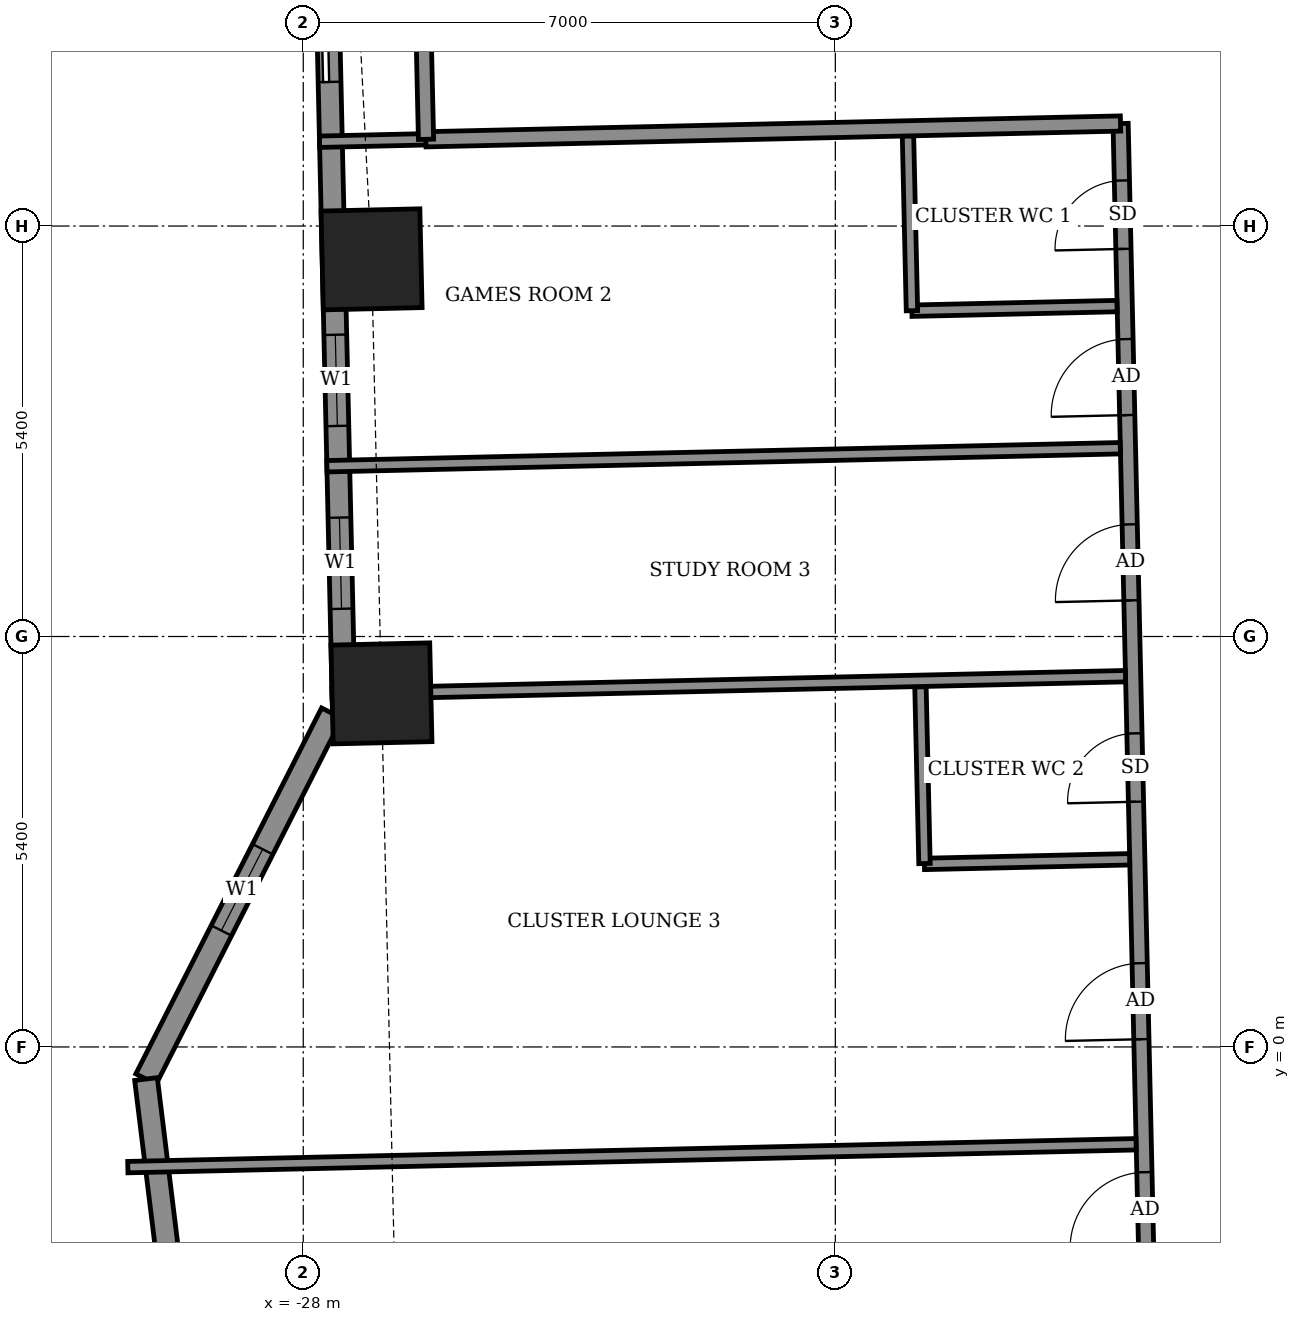
"""IFC4 building model, lengths in metres.
Left out: names, types, materials, properties, quantities, classifications, styles, units other than length and angle.
Written with IfcOpenShell. Run it as: python <this file> out.ifc"""

import sys

from ifc_helpers import new_model, si_unit, direction, frame, frame_2d, origin, origin_2d, place, context, subcontext, project, spatial, rectangle, extrude, element, fill, save


model = new_model("IFC4")
c1 = context("Model", 3, precision=1e-05, world=origin(), true_north=direction((0.0, 1.0)))
c2 = subcontext(c1, "Body", "Model", "MODEL_VIEW")
j1 = project(units=[si_unit("LENGTHUNIT", "METRE"), si_unit("PLANEANGLEUNIT", "RADIAN")], contexts=[c1])
p1 = place(None, origin())
s1 = spatial("IfcSite", under=j1, at=p1, CompositionType="ELEMENT")
p2 = place(p1, origin())
s2 = spatial("IfcBuilding", under=s1, at=p2, CompositionType="ELEMENT")
p3 = place(p2, frame((0.0, 0.0, 130.1)))
s3 = spatial("IfcBuildingStorey", under=s2, at=p3, CompositionType="ELEMENT", Elevation=130.1)
for number, where, z_axis, x_axis in (
    (1, (-27.101, 10.362, -0.55), (0.0, 0.0, 1.0), (0.023, -1.0, 0.0)),
    (2, (-26.971, 4.652, -0.55), (0.0, 0.0, 1.0), (0.023, -1.0, 0.0)),
):
    element("IfcColumn", number, at=place(p3, frame(where, z_axis=z_axis, x_axis=x_axis)), inside=s3, PredefinedType="COLUMN", context=c2, shape_type="SweptSolid", body=[
        extrude(rectangle(XDim=1.3, YDim=1.3, at=origin_2d()), origin(), (0.0, 0.0, 1.0), 3.6),
    ])
p4 = place(p3, frame((-27.727, 15.912, 0.0), z_axis=(0.0, 0.0, 1.0), x_axis=(0.022690078929, -0.999742547018, 0.0)))
e3 = element("IfcWall", 3, at=p4, inside=s3, PredefinedType="SOLIDWALL", context=c2, shape_type="SweptSolid", body=[
    extrude(rectangle(XDim=11.33, YDim=0.3, at=frame_2d((5.665, 0.0))), origin(), (0.0, 0.0, 1.0), 3.05),
])
p5 = place(p4, frame((1.717, 0.0, 0.0)))
e4 = element("IfcOpeningElement", 4, at=p5, cuts=e3, PredefinedType="OPENING", context=c2, shape_type="SweptSolid", body=[
    extrude(rectangle(XDim=1.5, YDim=2.4, at=frame_2d((0.75, 1.2))), frame((0.0, 0.16, 0.0), z_axis=(0.0, -1.0, 0.0), x_axis=(1.0, 0.0, 0.0)), (0.0, 0.0, 1.0), 0.32),
])
p6 = place(p4, frame((6.544, 0.0, 0.9)))
e5 = element("IfcOpeningElement", 5, at=p6, cuts=e3, PredefinedType="OPENING", context=c2, shape_type="SweptSolid", body=[
    extrude(rectangle(XDim=1.2, YDim=1.5, at=frame_2d((0.6, 0.75))), frame((0.0, 0.16, 0.0), z_axis=(0.0, -1.0, 0.0), x_axis=(1.0, 0.0, 0.0)), (0.0, 0.0, 1.0), 0.32),
])
p7 = place(p4, frame((8.95, 0.0, 0.9)))
e6 = element("IfcOpeningElement", 6, at=p7, cuts=e3, PredefinedType="OPENING", context=c2, shape_type="SweptSolid", body=[
    extrude(rectangle(XDim=1.2, YDim=1.5, at=frame_2d((0.6, 0.75))), frame((0.0, 0.16, 0.0), z_axis=(0.0, -1.0, 0.0), x_axis=(1.0, 0.0, 0.0)), (0.0, 0.0, 1.0), 0.32),
])
p8 = place(p3, frame((-27.625, 4.392, 0.0), z_axis=(0.0, 0.0, 1.0), x_axis=(-0.45268572245, -0.891670138947, 0.0)))
e7 = element("IfcWall", 7, at=p8, inside=s3, PredefinedType="SOLIDWALL", context=c2, shape_type="SweptSolid", body=[
    extrude(rectangle(XDim=5.399, YDim=0.3, at=frame_2d((2.7, 0.0))), origin(), (0.0, 0.0, 1.0), 3.05),
])
p9 = place(p8, frame((2.008, 0.0, 0.9)))
e8 = element("IfcOpeningElement", 8, at=p9, cuts=e7, PredefinedType="OPENING", context=c2, shape_type="SweptSolid", body=[
    extrude(rectangle(XDim=1.2, YDim=1.5, at=frame_2d((0.6, 0.75))), frame((0.0, 0.16, 0.0), z_axis=(0.0, -1.0, 0.0), x_axis=(1.0, 0.0, 0.0)), (0.0, 0.0, 1.0), 0.32),
])
p10 = place(p3, frame((-30.069, -0.422, 0.0), z_axis=(0.0, 0.0, 1.0), x_axis=(0.122206978992, -0.992504636909, 0.0)))
e9 = element("IfcWall", 9, at=p10, inside=s3, PredefinedType="SOLIDWALL", context=c2, shape_type="SweptSolid", body=[
    extrude(rectangle(XDim=5.574, YDim=0.3, at=frame_2d((2.787, 0.0))), origin(), (0.0, 0.0, 1.0), 3.05),
])
p11 = place(p10, frame((2.187, 0.0, 0.9)))
e10 = element("IfcOpeningElement", 10, at=p11, cuts=e9, PredefinedType="OPENING", context=c2, shape_type="SweptSolid", body=[
    extrude(rectangle(XDim=1.2, YDim=1.5, at=frame_2d((0.6, 0.75))), frame((0.0, 0.16, 0.0), z_axis=(0.0, -1.0, 0.0), x_axis=(1.0, 0.0, 0.0)), (0.0, 0.0, 1.0), 0.32),
])
p12 = place(p3, frame((-30.42, 12.7, 0.0), z_axis=(0.0, 0.0, 1.0), x_axis=(-0.02278694782, 0.999740343794, 0.0)))
e11 = element("IfcWall", 11, at=p12, inside=s3, PredefinedType="USERDEFINED", context=c2, shape_type="SweptSolid", body=[
    extrude(rectangle(XDim=3.3, YDim=0.55, at=frame_2d((1.65, 0.0))), origin(), (0.0, 0.0, 1.0), 0.8),
])
p13 = place(p3, frame((-16.603, -16.218, 0.0), z_axis=(0.0, 0.0, 1.0), x_axis=(-0.022698146637, 0.999742363881, 0.0)))
e12 = element("IfcWall", 12, at=p13, inside=s3, PredefinedType="PARTITIONING", context=c2, shape_type="SweptSolid", body=[
    extrude(rectangle(XDim=28.374, YDim=0.2, at=frame_2d((14.187, 0.0))), origin(), (0.0, 0.0, 1.0), 3.05),
])
p14 = place(p13, frame((24.537, 0.0, 0.0)))
e13 = element("IfcOpeningElement", 13, at=p14, cuts=e12, PredefinedType="OPENING", context=c2, shape_type="SweptSolid", body=[
    extrude(rectangle(XDim=1.0, YDim=2.1, at=frame_2d((0.5, 1.05))), frame((0.0, 0.11, 0.0), z_axis=(0.0, -1.0, 0.0), x_axis=(1.0, 0.0, 0.0)), (0.0, 0.0, 1.0), 0.22),
])
p15 = place(p13, frame((26.724, 0.0, 0.0)))
e14 = element("IfcOpeningElement", 14, at=p15, cuts=e12, PredefinedType="OPENING", context=c2, shape_type="SweptSolid", body=[
    extrude(rectangle(XDim=0.9, YDim=2.1, at=frame_2d((0.45, 1.05))), frame((0.0, 0.11, 0.0), z_axis=(0.0, -1.0, 0.0), x_axis=(1.0, 0.0, 0.0)), (0.0, 0.0, 1.0), 0.22),
])
p16 = place(p13, frame((22.099, 0.0, 0.0)))
e15 = element("IfcOpeningElement", 15, at=p16, cuts=e12, PredefinedType="OPENING", context=c2, shape_type="SweptSolid", body=[
    extrude(rectangle(XDim=1.0, YDim=2.1, at=frame_2d((0.5, 1.05))), frame((0.0, 0.11, 0.0), z_axis=(0.0, -1.0, 0.0), x_axis=(1.0, 0.0, 0.0)), (0.0, 0.0, 1.0), 0.22),
])
p17 = place(p13, frame((16.324, 0.0, 0.0)))
e16 = element("IfcOpeningElement", 16, at=p17, cuts=e12, PredefinedType="OPENING", context=c2, shape_type="SweptSolid", body=[
    extrude(rectangle(XDim=1.0, YDim=2.1, at=frame_2d((0.5, 1.05))), frame((0.0, 0.11, 0.0), z_axis=(0.0, -1.0, 0.0), x_axis=(1.0, 0.0, 0.0)), (0.0, 0.0, 1.0), 0.22),
])
p18 = place(p13, frame((19.449, 0.0, 0.0)))
e17 = element("IfcOpeningElement", 17, at=p18, cuts=e12, PredefinedType="OPENING", context=c2, shape_type="SweptSolid", body=[
    extrude(rectangle(XDim=0.9, YDim=2.1, at=frame_2d((0.45, 1.05))), frame((0.0, 0.11, 0.0), z_axis=(0.0, -1.0, 0.0), x_axis=(1.0, 0.0, 0.0)), (0.0, 0.0, 1.0), 0.22),
])
p19 = place(p13, frame((13.574, 0.0, 0.0)))
e18 = element("IfcOpeningElement", 18, at=p19, cuts=e12, PredefinedType="OPENING", context=c2, shape_type="SweptSolid", body=[
    extrude(rectangle(XDim=1.0, YDim=2.1, at=frame_2d((0.5, 1.05))), frame((0.0, 0.11, 0.0), z_axis=(0.0, -1.0, 0.0), x_axis=(1.0, 0.0, 0.0)), (0.0, 0.0, 1.0), 0.22),
])
p20 = place(p13, frame((11.449, 0.0, 0.0)))
e19 = element("IfcOpeningElement", 19, at=p20, cuts=e12, PredefinedType="OPENING", context=c2, shape_type="SweptSolid", body=[
    extrude(rectangle(XDim=0.9, YDim=2.1, at=frame_2d((0.45, 1.05))), frame((0.0, 0.11, 0.0), z_axis=(0.0, -1.0, 0.0), x_axis=(1.0, 0.0, 0.0)), (0.0, 0.0, 1.0), 0.22),
])
p21 = place(p13, frame((8.524, 0.0, 0.0)))
e20 = element("IfcOpeningElement", 20, at=p21, cuts=e12, PredefinedType="OPENING", context=c2, shape_type="SweptSolid", body=[
    extrude(rectangle(XDim=1.0, YDim=2.1, at=frame_2d((0.5, 1.05))), frame((0.0, 0.11, 0.0), z_axis=(0.0, -1.0, 0.0), x_axis=(1.0, 0.0, 0.0)), (0.0, 0.0, 1.0), 0.22),
])
p22 = place(p13, frame((5.325, 0.0, 0.0)))
e21 = element("IfcOpeningElement", 21, at=p22, cuts=e12, PredefinedType="OPENING", context=c2, shape_type="SweptSolid", body=[
    extrude(rectangle(XDim=1.0, YDim=2.1, at=frame_2d((0.5, 1.05))), frame((0.0, 0.11, 0.0), z_axis=(0.0, -1.0, 0.0), x_axis=(1.0, 0.0, 0.0)), (0.0, 0.0, 1.0), 0.22),
])
p23 = place(p13, frame((2.85, 0.0, 0.0)))
e22 = element("IfcOpeningElement", 22, at=p23, cuts=e12, PredefinedType="OPENING", context=c2, shape_type="SweptSolid", body=[
    extrude(rectangle(XDim=1.0, YDim=2.1, at=frame_2d((0.5, 1.05))), frame((0.0, 0.11, 0.0), z_axis=(0.0, -1.0, 0.0), x_axis=(1.0, 0.0, 0.0)), (0.0, 0.0, 1.0), 0.22),
])
p24 = place(p13, frame((0.75, 0.0, 0.0)))
e23 = element("IfcOpeningElement", 23, at=p24, cuts=e12, PredefinedType="OPENING", context=c2, shape_type="SweptSolid", body=[
    extrude(rectangle(XDim=0.9, YDim=2.1, at=frame_2d((0.45, 1.05))), frame((0.0, 0.11, 0.0), z_axis=(0.0, -1.0, 0.0), x_axis=(1.0, 0.0, 0.0)), (0.0, 0.0, 1.0), 0.22),
])
p25 = place(p3, frame((-30.308, -1.581, 0.0), z_axis=(0.0, 0.0, 1.0), x_axis=(0.999742613892, 0.022687132236, 0.0)))
e24 = element("IfcWall", 24, at=p25, inside=s3, PredefinedType="PARTITIONING", context=c2, shape_type="SweptSolid", body=[
    extrude(rectangle(XDim=13.269, YDim=0.15, at=frame_2d((6.634, 0.0))), origin(), (0.0, 0.0, 1.0), 2.05),
])
p26 = place(p3, frame((-19.828, 2.408, 0.0), z_axis=(0.0, 0.0, 1.0), x_axis=(0.99974458177, 0.022600248254, 0.0)))
e25 = element("IfcWall", 25, at=p26, inside=s3, PredefinedType="PARTITIONING", context=c2, shape_type="SweptSolid", body=[
    extrude(rectangle(XDim=2.701, YDim=0.15, at=frame_2d((1.35, 0.0))), origin(), (0.0, 0.0, 1.0), 3.05),
])
p27 = place(p3, frame((-19.827, 2.413, 0.0), z_axis=(0.0, 0.0, 1.0), x_axis=(-0.02279059109, 0.999740260747, 0.0)))
e26 = element("IfcWall", 26, at=p27, inside=s3, PredefinedType="PARTITIONING", context=c2, shape_type="SweptSolid", body=[
    extrude(rectangle(XDim=2.324, YDim=0.15, at=frame_2d((1.162, 0.0))), origin(), (0.0, 0.0, 1.0), 3.05),
])
p28 = place(p3, frame((-27.621, 4.641, 0.0), z_axis=(0.0, 0.0, 1.0), x_axis=(0.999742728106, 0.022682098664, 0.0)))
e27 = element("IfcWall", 27, at=p28, inside=s3, PredefinedType="PARTITIONING", context=c2, shape_type="SweptSolid", body=[
    extrude(rectangle(XDim=10.441, YDim=0.15, at=frame_2d((5.22, 0.0))), origin(), (0.0, 0.0, 1.0), 3.05),
])
p29 = place(p3, frame((-27.689, 7.64, 0.0), z_axis=(0.0, 0.0, 1.0), x_axis=(0.99974219758, 0.022705470222, 0.0)))
e28 = element("IfcWall", 28, at=p29, inside=s3, PredefinedType="PARTITIONING", context=c2, shape_type="SweptSolid", body=[
    extrude(rectangle(XDim=10.441, YDim=0.15, at=frame_2d((5.22, 0.0))), origin(), (0.0, 0.0, 1.0), 2.55),
])
p30 = place(p3, frame((-19.993, 9.686, 0.0), z_axis=(0.0, 0.0, 1.0), x_axis=(0.999744396973, 0.02260842146, 0.0)))
e29 = element("IfcWall", 29, at=p30, inside=s3, PredefinedType="PARTITIONING", context=c2, shape_type="SweptSolid", body=[
    extrude(rectangle(XDim=2.7, YDim=0.15, at=frame_2d((1.35, 0.0))), origin(), (0.0, 0.0, 1.0), 3.05),
])
p31 = place(p3, frame((-19.992, 9.686, 0.0), z_axis=(0.0, 0.0, 1.0), x_axis=(-0.022612884682, 0.999744296031, 0.0)))
e30 = element("IfcWall", 30, at=p31, inside=s3, PredefinedType="PARTITIONING", context=c2, shape_type="SweptSolid", body=[
    extrude(rectangle(XDim=2.3, YDim=0.15, at=frame_2d((1.15, 0.0))), origin(), (0.0, 0.0, 1.0), 3.05),
])
p32 = place(p3, frame((-27.786, 11.909, 0.0), z_axis=(0.0, 0.0, 1.0), x_axis=(0.999740216184, 0.022792545827, 0.0)))
e31 = element("IfcWall", 31, at=p32, inside=s3, PredefinedType="PARTITIONING", context=c2, shape_type="SweptSolid", body=[
    extrude(rectangle(XDim=1.403, YDim=0.15, at=frame_2d((0.702, 0.0))), origin(), (0.0, 0.0, 1.0), 2.55),
])
p33 = place(p3, frame((-26.387, 11.941, 0.0), z_axis=(0.0, 0.0, 1.0), x_axis=(0.999741076645, 0.022754772455, 0.0)))
e32 = element("IfcWall", 32, at=p33, inside=s3, PredefinedType="PARTITIONING", context=c2, shape_type="SweptSolid", body=[
    extrude(rectangle(XDim=9.141, YDim=0.2, at=frame_2d((4.571, 0.0))), origin(), (0.0, 0.0, 1.0), 3.05),
])
p34 = place(p3, frame((-26.385, 11.941, 0.0), z_axis=(0.0, 0.0, 1.0), x_axis=(-0.022617910375, 0.999744182344, 0.0)))
e33 = element("IfcWall", 33, at=p34, inside=s3, PredefinedType="PARTITIONING", context=c2, shape_type="SweptSolid", body=[
    extrude(rectangle(XDim=1.5, YDim=0.2, at=frame_2d((0.75, 0.0))), origin(), (0.0, 0.0, 1.0), 3.05),
])
p35 = place(p5, origin())
e34 = element("IfcDoor", 34, at=p35, inside=s3, OperationType="SLIDING_TO_LEFT", PredefinedType="DOOR", context=c2, shape_type="SweptSolid", body=[
    extrude(rectangle(XDim=1.5, YDim=2.4, at=frame_2d((0.75, 1.2))), frame((0.0, 0.025, 0.0), z_axis=(0.0, -1.0, 0.0), x_axis=(1.0, 0.0, 0.0)), (0.0, 0.0, 1.0), 0.05),
])
fill(e4, e34)
p36 = place(p6, origin())
e35 = element("IfcWindow", 35, at=p36, inside=s3, PartitioningType="SINGLE_PANEL", PredefinedType="WINDOW", context=c2, shape_type="SweptSolid", body=[
    extrude(rectangle(XDim=1.2, YDim=1.5, at=frame_2d((0.6, 0.75))), frame((0.0, 0.03, 0.0), z_axis=(0.0, -1.0, 0.0), x_axis=(1.0, 0.0, 0.0)), (0.0, 0.0, 1.0), 0.06),
])
fill(e5, e35)
p37 = place(p7, origin())
e36 = element("IfcWindow", 36, at=p37, inside=s3, PartitioningType="SINGLE_PANEL", PredefinedType="WINDOW", context=c2, shape_type="SweptSolid", body=[
    extrude(rectangle(XDim=1.2, YDim=1.5, at=frame_2d((0.6, 0.75))), frame((0.0, 0.03, 0.0), z_axis=(0.0, -1.0, 0.0), x_axis=(1.0, 0.0, 0.0)), (0.0, 0.0, 1.0), 0.06),
])
fill(e6, e36)
p38 = place(p9, origin())
e37 = element("IfcWindow", 37, at=p38, inside=s3, PartitioningType="SINGLE_PANEL", PredefinedType="WINDOW", context=c2, shape_type="SweptSolid", body=[
    extrude(rectangle(XDim=1.2, YDim=1.5, at=frame_2d((0.6, 0.75))), frame((0.0, 0.03, 0.0), z_axis=(0.0, -1.0, 0.0), x_axis=(1.0, 0.0, 0.0)), (0.0, 0.0, 1.0), 0.06),
])
fill(e8, e37)
p39 = place(p14, origin())
e38 = element("IfcDoor", 38, at=p39, inside=s3, OperationType="SINGLE_SWING_RIGHT", PredefinedType="DOOR", context=c2, shape_type="SweptSolid", body=[
    extrude(rectangle(XDim=1.0, YDim=2.1, at=frame_2d((0.5, 1.05))), frame((0.0, 0.025, 0.0), z_axis=(0.0, -1.0, 0.0), x_axis=(1.0, 0.0, 0.0)), (0.0, 0.0, 1.0), 0.05),
])
fill(e13, e38)
p40 = place(p15, origin())
e39 = element("IfcDoor", 39, at=p40, inside=s3, OperationType="SINGLE_SWING_LEFT", PredefinedType="DOOR", context=c2, shape_type="SweptSolid", body=[
    extrude(rectangle(XDim=0.9, YDim=2.1, at=frame_2d((0.45, 1.05))), frame((0.0, 0.025, 0.0), z_axis=(0.0, -1.0, 0.0), x_axis=(1.0, 0.0, 0.0)), (0.0, 0.0, 1.0), 0.05),
])
fill(e14, e39)
p41 = place(p16, origin())
e40 = element("IfcDoor", 40, at=p41, inside=s3, OperationType="SINGLE_SWING_LEFT", PredefinedType="DOOR", context=c2, shape_type="SweptSolid", body=[
    extrude(rectangle(XDim=1.0, YDim=2.1, at=frame_2d((0.5, 1.05))), frame((0.0, 0.025, 0.0), z_axis=(0.0, -1.0, 0.0), x_axis=(1.0, 0.0, 0.0)), (0.0, 0.0, 1.0), 0.05),
])
fill(e15, e40)
p42 = place(p17, origin())
e41 = element("IfcDoor", 41, at=p42, inside=s3, OperationType="SINGLE_SWING_RIGHT", PredefinedType="DOOR", context=c2, shape_type="SweptSolid", body=[
    extrude(rectangle(XDim=1.0, YDim=2.1, at=frame_2d((0.5, 1.05))), frame((0.0, 0.025, 0.0), z_axis=(0.0, -1.0, 0.0), x_axis=(1.0, 0.0, 0.0)), (0.0, 0.0, 1.0), 0.05),
])
fill(e16, e41)
p43 = place(p18, origin())
e42 = element("IfcDoor", 42, at=p43, inside=s3, OperationType="SINGLE_SWING_RIGHT", PredefinedType="DOOR", context=c2, shape_type="SweptSolid", body=[
    extrude(rectangle(XDim=0.9, YDim=2.1, at=frame_2d((0.45, 1.05))), frame((0.0, 0.025, 0.0), z_axis=(0.0, -1.0, 0.0), x_axis=(1.0, 0.0, 0.0)), (0.0, 0.0, 1.0), 0.05),
])
fill(e17, e42)
p44 = place(p19, origin())
e43 = element("IfcDoor", 43, at=p44, inside=s3, OperationType="SINGLE_SWING_LEFT", PredefinedType="DOOR", context=c2, shape_type="SweptSolid", body=[
    extrude(rectangle(XDim=1.0, YDim=2.1, at=frame_2d((0.5, 1.05))), frame((0.0, 0.025, 0.0), z_axis=(0.0, -1.0, 0.0), x_axis=(1.0, 0.0, 0.0)), (0.0, 0.0, 1.0), 0.05),
])
fill(e18, e43)
save(model, sys.argv[1])
